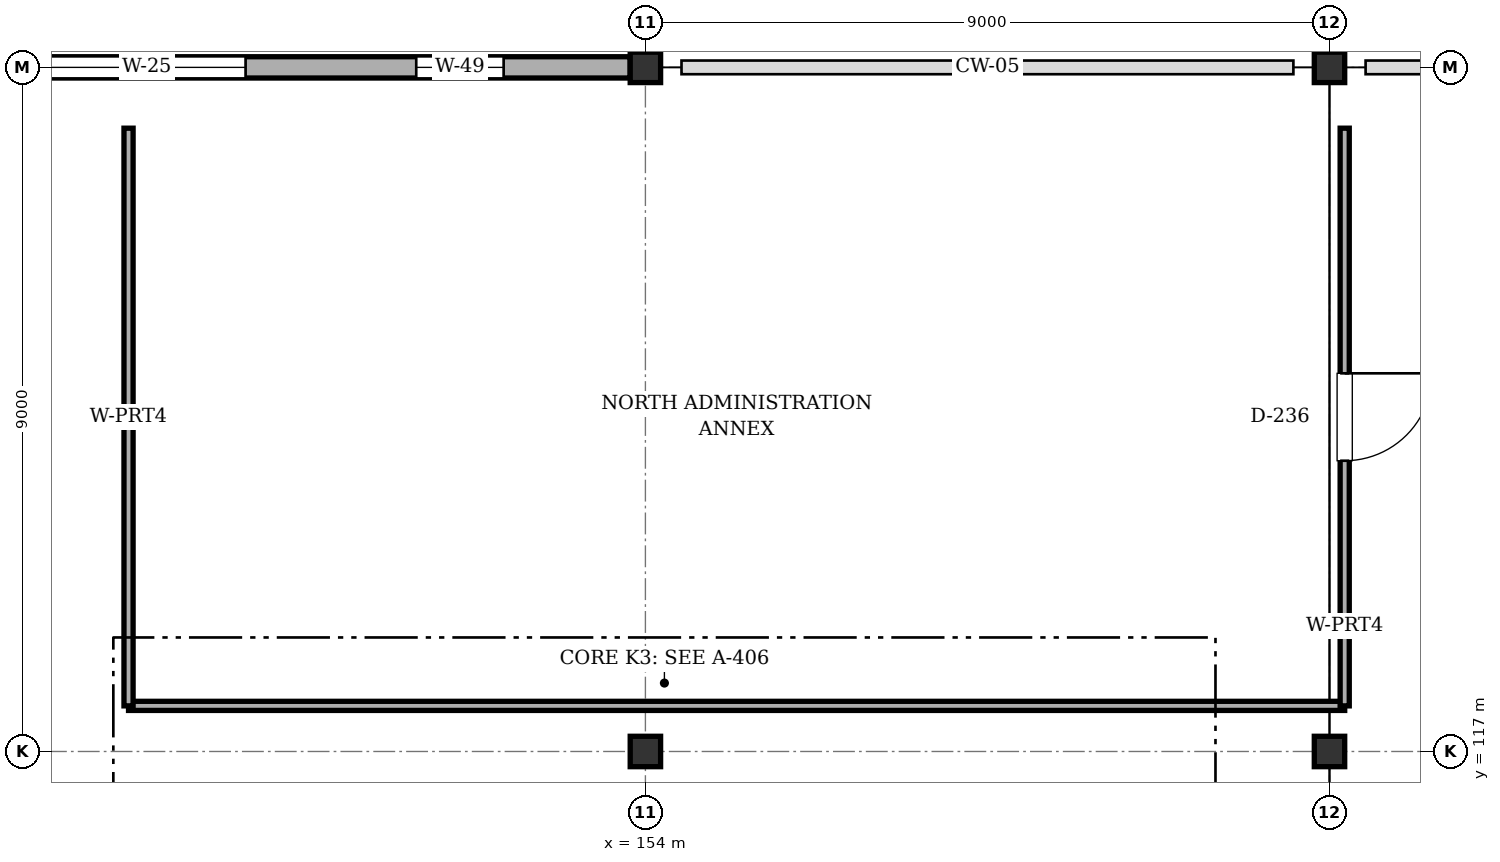
"""IFC4 building model, lengths in metres.
Left out: names, types, materials, properties, quantities, classifications, styles, units other than length and angle.
Written with IfcOpenShell. Run it as: python <this file> out.ifc"""

import sys

from ifc_helpers import new_model, si_unit, direction, frame, frame_2d, origin, origin_2d, place, context, subcontext, project, spatial, rectangle, i_section, extrude, element, fill, save


model = new_model("IFC4")
c1 = context("Model", 3, precision=1e-05, world=origin(), true_north=direction((0.0, 1.0)))
c2 = subcontext(c1, "Body", "Model", "MODEL_VIEW")
j1 = project(units=[si_unit("LENGTHUNIT", "METRE"), si_unit("PLANEANGLEUNIT", "RADIAN")], contexts=[c1])
p1 = place(None, origin())
s1 = spatial("IfcSite", under=j1, at=p1, CompositionType="ELEMENT")
p2 = place(p1, origin())
s2 = spatial("IfcBuilding", under=s1, at=p2, CompositionType="ELEMENT")
p3 = place(p2, frame((0.0, 0.0, 14.4)))
s3 = spatial("IfcBuildingStorey", under=s2, at=p3, CompositionType="ELEMENT", Elevation=14.4)
for number, where, z_axis, x_axis in (
    (1, (154.0, 117.0, 0.0), (0.0, 0.0, 1.0), (1.0, 0.0, 0.0)),
    (2, (154.0, 126.0, 0.0), (0.0, 0.0, 1.0), (1.0, 0.0, 0.0)),
    (3, (163.0, 117.0, 0.0), (0.0, 0.0, 1.0), (1.0, 0.0, 0.0)),
    (4, (163.0, 126.0, 0.0), (0.0, 0.0, 1.0), (1.0, 0.0, 0.0)),
):
    element("IfcColumn", number, at=place(p3, frame(where, z_axis=z_axis, x_axis=x_axis)), inside=s3, PredefinedType="COLUMN", context=c2, shape_type="SweptSolid", body=[
        extrude(i_section(OverallWidth=0.4, OverallDepth=0.4, WebThickness=0.013, FlangeThickness=0.021, FilletRadius=0.022, at=origin_2d()), origin(), (0.0, 0.0, 1.0), 3.2),
    ])
p4 = place(p3, frame((145.2, 126.0, 0.0), z_axis=(0.0, 0.0, 1.0), x_axis=(1.0, 0.0, 0.0)))
e5 = element("IfcWall", 5, at=p4, inside=s3, PredefinedType="SOLIDWALL", context=c2, shape_type="SweptSolid", body=[
    extrude(rectangle(XDim=8.6, YDim=0.28, at=frame_2d((4.3, 0.0))), origin(), (0.0, 0.0, 1.0), 2.515),
])
p5 = place(p4, frame((0.94, 0.0, 0.9)))
e6 = element("IfcOpeningElement", 6, at=p5, cuts=e5, PredefinedType="OPENING", context=c2, shape_type="SweptSolid", body=[
    extrude(rectangle(XDim=2.6, YDim=1.4, at=frame_2d((1.3, 0.7))), frame((0.0, 0.15, 0.0), z_axis=(0.0, -1.0, 0.0), x_axis=(1.0, 0.0, 0.0)), (0.0, 0.0, 1.0), 0.3),
])
p6 = place(p4, frame((5.785, 0.0, 0.9)))
e7 = element("IfcOpeningElement", 7, at=p6, cuts=e5, PredefinedType="OPENING", context=c2, shape_type="SweptSolid", body=[
    extrude(rectangle(XDim=1.15, YDim=1.45, at=frame_2d((0.575, 0.725))), frame((0.0, 0.15, 0.0), z_axis=(0.0, -1.0, 0.0), x_axis=(1.0, 0.0, 0.0)), (0.0, 0.0, 1.0), 0.3),
])
p7 = place(p3, frame((163.2, 117.6, 0.0), z_axis=(0.0, 0.0, 1.0), x_axis=(-1.0, 0.0, 0.0)))
e8 = element("IfcWall", 8, at=p7, inside=s3, PredefinedType="PARTITIONING", context=c2, shape_type="SweptSolid", body=[
    extrude(rectangle(XDim=16.0, YDim=0.12, at=frame_2d((8.0, 0.0))), origin(), (0.0, 0.0, 1.0), 2.375),
])
p8 = place(p3, frame((147.2, 117.6, 0.0), z_axis=(0.0, 0.0, 1.0), x_axis=(0.0, 1.0, 0.0)))
e9 = element("IfcWall", 9, at=p8, inside=s3, PredefinedType="PARTITIONING", context=c2, shape_type="SweptSolid", body=[
    extrude(rectangle(XDim=7.6, YDim=0.12, at=frame_2d((3.8, 0.0))), origin(), (0.0, 0.0, 1.0), 2.515),
])
p9 = place(p3, frame((163.2, 125.2, 0.0), z_axis=(0.0, 0.0, 1.0), x_axis=(0.0, -1.0, 0.0)))
e10 = element("IfcWall", 10, at=p9, inside=s3, PredefinedType="PARTITIONING", context=c2, shape_type="SweptSolid", body=[
    extrude(rectangle(XDim=7.6, YDim=0.12, at=frame_2d((3.8, 0.0))), origin(), (0.0, 0.0, 1.0), 2.375),
])
p10 = place(p9, frame((3.225, 0.0, 0.0)))
e11 = element("IfcOpeningElement", 11, at=p10, cuts=e10, PredefinedType="OPENING", context=c2, shape_type="SweptSolid", body=[
    extrude(rectangle(XDim=1.15, YDim=2.1, at=frame_2d((0.575, 1.05))), frame((0.0, 0.07, 0.0), z_axis=(0.0, -1.0, 0.0), x_axis=(1.0, 0.0, 0.0)), (0.0, 0.0, 1.0), 0.14),
])
p11 = place(p5, origin())
e12 = element("IfcWindow", 12, at=p11, inside=s3, PartitioningType="SINGLE_PANEL", PredefinedType="WINDOW", context=c2, shape_type="SweptSolid", body=[
    extrude(rectangle(XDim=2.6, YDim=1.4, at=frame_2d((1.3, 0.7))), frame((0.0, 0.03, 0.0), z_axis=(0.0, -1.0, 0.0), x_axis=(1.0, 0.0, 0.0)), (0.0, 0.0, 1.0), 0.06),
])
fill(e6, e12)
p12 = place(p6, origin())
e13 = element("IfcWindow", 13, at=p12, inside=s3, PartitioningType="SINGLE_PANEL", PredefinedType="WINDOW", context=c2, shape_type="SweptSolid", body=[
    extrude(rectangle(XDim=1.15, YDim=1.45, at=frame_2d((0.575, 0.725))), frame((0.0, 0.03, 0.0), z_axis=(0.0, -1.0, 0.0), x_axis=(1.0, 0.0, 0.0)), (0.0, 0.0, 1.0), 0.06),
])
fill(e7, e13)
p13 = place(p10, origin())
e14 = element("IfcDoor", 14, at=p13, inside=s3, OperationType="SINGLE_SWING_LEFT", PredefinedType="DOOR", context=c2, shape_type="SweptSolid", body=[
    extrude(rectangle(XDim=1.15, YDim=2.1, at=frame_2d((0.575, 1.05))), frame((0.0, 0.025, 0.0), z_axis=(0.0, -1.0, 0.0), x_axis=(1.0, 0.0, 0.0)), (0.0, 0.0, 1.0), 0.05),
])
fill(e11, e14)
save(model, sys.argv[1])
